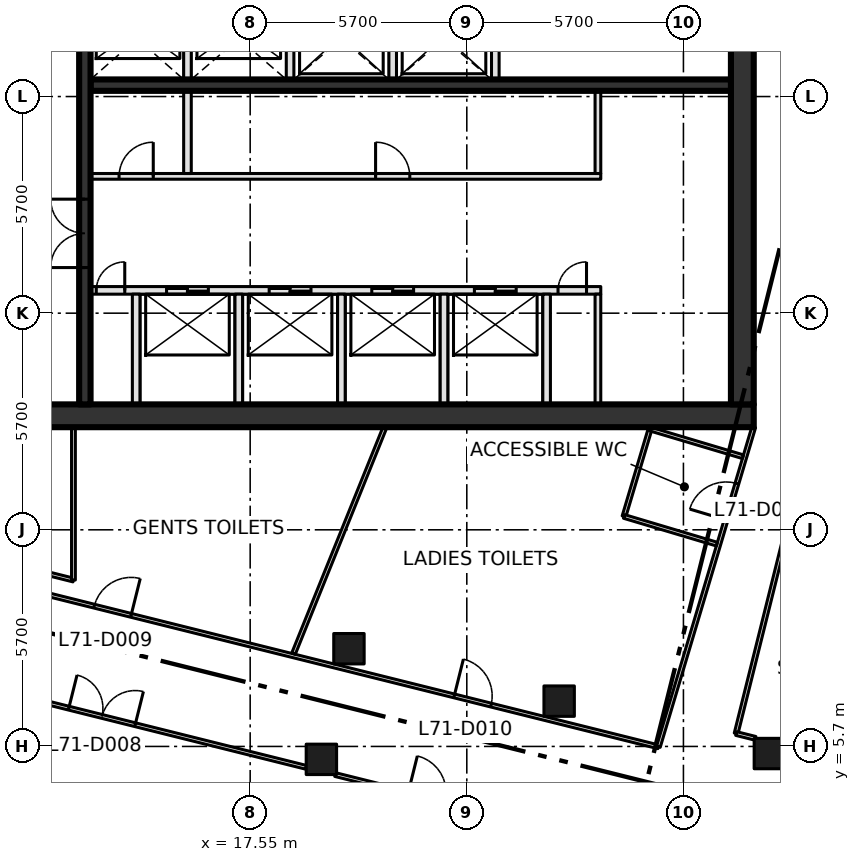
"""IFC4 building model, lengths in metres.
Left out: names, types, materials, properties, quantities, classifications, styles, units other than length and angle.
Written with IfcOpenShell. Run it as: python <this file> out.ifc"""

import sys

from ifc_helpers import new_model, si_unit, direction, frame, frame_2d, origin, origin_2d, place, context, subcontext, project, spatial, rectangle, extrude, element, fill, save


model = new_model("IFC4")
c1 = context("Model", 3, precision=1e-05, world=origin(), true_north=direction((0.0, 1.0)))
c2 = subcontext(c1, "Body", "Model", "MODEL_VIEW")
j1 = project(units=[si_unit("LENGTHUNIT", "METRE"), si_unit("PLANEANGLEUNIT", "RADIAN")], contexts=[c1])
p1 = place(None, origin())
s1 = spatial("IfcSite", under=j1, at=p1, CompositionType="ELEMENT")
p2 = place(p1, origin())
s2 = spatial("IfcBuilding", under=s1, at=p2, CompositionType="ELEMENT")
p3 = place(p2, frame((0.0, 0.0, 310.8)))
s3 = spatial("IfcBuildingStorey", under=s2, at=p3, CompositionType="ELEMENT", Elevation=310.8)
for number, where, z_axis, x_axis in (
    (1, (19.424, 5.36, 0.0), (0.0, 0.0, 1.0), (1.0, 0.0, 0.0)),
    (2, (20.149, 8.271, 0.0), (0.0, 0.0, 1.0), (1.0, 0.0, 0.0)),
    (3, (25.68, 6.892, 0.0), (0.0, 0.0, 1.0), (1.0, 0.0, 0.0)),
    (4, (31.211, 5.513, 0.0), (0.0, 0.0, 1.0), (1.0, 0.0, 0.0)),
):
    element("IfcColumn", number, at=place(p3, frame(where, z_axis=z_axis, x_axis=x_axis)), inside=s3, PredefinedType="COLUMN", context=c2, shape_type="SweptSolid", body=[
        extrude(rectangle(XDim=0.8, YDim=0.8, at=origin_2d()), origin(), (0.0, 0.0, 1.0), 4.2),
    ])
p4 = place(p3, frame((8.0, 14.4, -0.3), z_axis=(0.0, 0.0, 1.0), x_axis=(1.0, 0.0, 0.0)))
e5 = element("IfcWall", 5, at=p4, inside=s3, PredefinedType="SHEAR", context=c2, shape_type="SweptSolid", body=[
    extrude(rectangle(XDim=22.8, YDim=0.6, at=frame_2d((11.4, 0.0))), origin(), (0.0, 0.0, 1.0), 4.2),
])
p5 = place(p4, frame((2.3, 0.0, 0.3)))
e6 = element("IfcOpeningElement", 6, at=p5, cuts=e5, PredefinedType="OPENING", context=c2, shape_type="SweptSolid", body=[
    extrude(rectangle(XDim=1.8, YDim=2.1, at=frame_2d((0.9, 1.05))), frame((0.0, 0.31, 0.0), z_axis=(0.0, -1.0, 0.0), x_axis=(1.0, 0.0, 0.0)), (0.0, 0.0, 1.0), 0.62),
])
p6 = place(p3, frame((30.5, 14.7, -0.3), z_axis=(0.0, 0.0, 1.0), x_axis=(0.0, 1.0, 0.0)))
e7 = element("IfcWall", 7, at=p6, inside=s3, PredefinedType="SHEAR", context=c2, shape_type="SweptSolid", body=[
    extrude(rectangle(XDim=21.0, YDim=0.6, at=frame_2d((10.5, 0.0))), origin(), (0.0, 0.0, 1.0), 4.2),
])
p7 = place(p3, frame((13.35, 17.7, 0.0), z_axis=(0.0, 0.0, 1.0), x_axis=(1.0, 0.0, 0.0)))
e8 = element("IfcWall", 8, at=p7, inside=s3, PredefinedType="SOLIDWALL", context=c2, shape_type="SweptSolid", body=[
    extrude(rectangle(XDim=13.425, YDim=0.2, at=frame_2d((6.712, 0.0))), origin(), (0.0, 0.0, 1.0), 3.9),
])
p8 = place(p7, frame((2.0, 0.0, 0.0)))
e9 = element("IfcOpeningElement", 9, at=p8, cuts=e8, PredefinedType="OPENING", context=c2, shape_type="SweptSolid", body=[
    extrude(rectangle(XDim=1.1, YDim=2.1, at=frame_2d((0.55, 1.05))), frame((0.0, 0.11, 0.0), z_axis=(0.0, -1.0, 0.0), x_axis=(1.0, 0.0, 0.0)), (0.0, 0.0, 1.0), 0.22),
])
p9 = place(p7, frame((4.7, 0.0, 0.0)))
e10 = element("IfcOpeningElement", 10, at=p9, cuts=e8, PredefinedType="OPENING", context=c2, shape_type="SweptSolid", body=[
    extrude(rectangle(XDim=1.1, YDim=2.1, at=frame_2d((0.55, 1.05))), frame((0.0, 0.11, 0.0), z_axis=(0.0, -1.0, 0.0), x_axis=(1.0, 0.0, 0.0)), (0.0, 0.0, 1.0), 0.22),
])
p10 = place(p7, frame((7.4, 0.0, 0.0)))
e11 = element("IfcOpeningElement", 11, at=p10, cuts=e8, PredefinedType="OPENING", context=c2, shape_type="SweptSolid", body=[
    extrude(rectangle(XDim=1.1, YDim=2.1, at=frame_2d((0.55, 1.05))), frame((0.0, 0.11, 0.0), z_axis=(0.0, -1.0, 0.0), x_axis=(1.0, 0.0, 0.0)), (0.0, 0.0, 1.0), 0.22),
])
p11 = place(p7, frame((10.1, 0.0, 0.0)))
e12 = element("IfcOpeningElement", 12, at=p11, cuts=e8, PredefinedType="OPENING", context=c2, shape_type="SweptSolid", body=[
    extrude(rectangle(XDim=1.1, YDim=2.1, at=frame_2d((0.55, 1.05))), frame((0.0, 0.11, 0.0), z_axis=(0.0, -1.0, 0.0), x_axis=(1.0, 0.0, 0.0)), (0.0, 0.0, 1.0), 0.22),
])
p12 = place(p7, frame((0.15, 0.0, 0.0)))
e13 = element("IfcOpeningElement", 13, at=p12, cuts=e8, PredefinedType="OPENING", context=c2, shape_type="SweptSolid", body=[
    extrude(rectangle(XDim=0.75, YDim=2.1, at=frame_2d((0.375, 1.05))), frame((0.0, 0.11, 0.0), z_axis=(0.0, -1.0, 0.0), x_axis=(1.0, 0.0, 0.0)), (0.0, 0.0, 1.0), 0.22),
])
p13 = place(p7, frame((12.3, 0.0, 0.0)))
e14 = element("IfcOpeningElement", 14, at=p13, cuts=e8, PredefinedType="OPENING", context=c2, shape_type="SweptSolid", body=[
    extrude(rectangle(XDim=0.75, YDim=2.1, at=frame_2d((0.375, 1.05))), frame((0.0, 0.11, 0.0), z_axis=(0.0, -1.0, 0.0), x_axis=(1.0, 0.0, 0.0)), (0.0, 0.0, 1.0), 0.22),
])
p14 = place(p3, frame((13.35, 20.7, 0.0), z_axis=(0.0, 0.0, 1.0), x_axis=(1.0, 0.0, 0.0)))
e15 = element("IfcWall", 15, at=p14, inside=s3, PredefinedType="PARTITIONING", context=c2, shape_type="SweptSolid", body=[
    extrude(rectangle(XDim=13.425, YDim=0.15, at=frame_2d((6.712, 0.0))), origin(), (0.0, 0.0, 1.0), 3.9),
])
p15 = place(p14, frame((0.75, 0.0, 0.0)))
e16 = element("IfcOpeningElement", 16, at=p15, cuts=e15, PredefinedType="OPENING", context=c2, shape_type="SweptSolid", body=[
    extrude(rectangle(XDim=0.9, YDim=2.1, at=frame_2d((0.45, 1.05))), frame((0.0, 0.085, 0.0), z_axis=(0.0, -1.0, 0.0), x_axis=(1.0, 0.0, 0.0)), (0.0, 0.0, 1.0), 0.17),
])
p16 = place(p14, frame((7.5, 0.0, 0.0)))
e17 = element("IfcOpeningElement", 17, at=p16, cuts=e15, PredefinedType="OPENING", context=c2, shape_type="SweptSolid", body=[
    extrude(rectangle(XDim=0.9, YDim=2.1, at=frame_2d((0.45, 1.05))), frame((0.0, 0.085, 0.0), z_axis=(0.0, -1.0, 0.0), x_axis=(1.0, 0.0, 0.0)), (0.0, 0.0, 1.0), 0.17),
])
p17 = place(p3, frame((13.35, 23.1, 0.0), z_axis=(0.0, 0.0, 1.0), x_axis=(1.0, 0.0, 0.0)))
e18 = element("IfcWall", 18, at=p17, inside=s3, PredefinedType="SHEAR", context=c2, shape_type="SweptSolid", body=[
    extrude(rectangle(XDim=16.85, YDim=0.3, at=frame_2d((8.425, 0.0))), origin(), (0.0, 0.0, 1.0), 3.9),
])
p18 = place(p3, frame((13.2, 14.7, 0.0), z_axis=(0.0, 0.0, 1.0), x_axis=(0.0, 1.0, 0.0)))
e19 = element("IfcWall", 19, at=p18, inside=s3, PredefinedType="SHEAR", context=c2, shape_type="SweptSolid", body=[
    extrude(rectangle(XDim=21.0, YDim=0.3, at=frame_2d((10.5, 0.0))), origin(), (0.0, 0.0, 1.0), 3.9),
])
p19 = place(p18, frame((3.6, 0.0, 0.0)))
e20 = element("IfcOpeningElement", 20, at=p19, cuts=e19, PredefinedType="OPENING", context=c2, shape_type="SweptSolid", body=[
    extrude(rectangle(XDim=1.8, YDim=2.1, at=frame_2d((0.9, 1.05))), frame((0.0, 0.16, 0.0), z_axis=(0.0, -1.0, 0.0), x_axis=(1.0, 0.0, 0.0)), (0.0, 0.0, 1.0), 0.32),
])
p20 = place(p18, frame((11.7, 0.0, 0.0)))
e21 = element("IfcOpeningElement", 21, at=p20, cuts=e19, PredefinedType="OPENING", context=c2, shape_type="SweptSolid", body=[
    extrude(rectangle(XDim=1.2, YDim=2.1, at=frame_2d((0.6, 1.05))), frame((0.0, 0.16, 0.0), z_axis=(0.0, -1.0, 0.0), x_axis=(1.0, 0.0, 0.0)), (0.0, 0.0, 1.0), 0.32),
])
p21 = place(p3, frame((14.55, 14.7, 0.0), z_axis=(0.0, 0.0, 1.0), x_axis=(0.0, 1.0, 0.0)))
e22 = element("IfcWall", 22, at=p21, inside=s3, PredefinedType="SOLIDWALL", context=c2, shape_type="SweptSolid", body=[
    extrude(rectangle(XDim=2.9, YDim=0.2, at=frame_2d((1.45, 0.0))), origin(), (0.0, 0.0, 1.0), 3.9),
])
p22 = place(p3, frame((15.9, 20.775, 0.0), z_axis=(0.0, 0.0, 1.0), x_axis=(0.0, 1.0, 0.0)))
e23 = element("IfcWall", 23, at=p22, inside=s3, PredefinedType="SOLIDWALL", context=c2, shape_type="SweptSolid", body=[
    extrude(rectangle(XDim=4.625, YDim=0.2, at=frame_2d((2.312, 0.0))), origin(), (0.0, 0.0, 1.0), 3.9),
])
p23 = place(p3, frame((17.25, 14.7, 0.0), z_axis=(0.0, 0.0, 1.0), x_axis=(0.0, 1.0, 0.0)))
e24 = element("IfcWall", 24, at=p23, inside=s3, PredefinedType="SOLIDWALL", context=c2, shape_type="SweptSolid", body=[
    extrude(rectangle(XDim=2.9, YDim=0.2, at=frame_2d((1.45, 0.0))), origin(), (0.0, 0.0, 1.0), 3.9),
])
p24 = place(p3, frame((18.6, 23.25, 0.0), z_axis=(0.0, 0.0, 1.0), x_axis=(0.0, 1.0, 0.0)))
e25 = element("IfcWall", 25, at=p24, inside=s3, PredefinedType="SOLIDWALL", context=c2, shape_type="SweptSolid", body=[
    extrude(rectangle(XDim=5.15, YDim=0.2, at=frame_2d((2.575, 0.0))), origin(), (0.0, 0.0, 1.0), 3.9),
])
p25 = place(p24, frame((3.15, 0.0, 0.0)))
e26 = element("IfcOpeningElement", 26, at=p25, cuts=e25, PredefinedType="OPENING", context=c2, shape_type="SweptSolid", body=[
    extrude(rectangle(XDim=1.2, YDim=2.1, at=frame_2d((0.6, 1.05))), frame((0.0, 0.11, 0.0), z_axis=(0.0, -1.0, 0.0), x_axis=(1.0, 0.0, 0.0)), (0.0, 0.0, 1.0), 0.22),
])
p26 = place(p3, frame((19.95, 14.7, 0.0), z_axis=(0.0, 0.0, 1.0), x_axis=(0.0, 1.0, 0.0)))
e27 = element("IfcWall", 27, at=p26, inside=s3, PredefinedType="SOLIDWALL", context=c2, shape_type="SweptSolid", body=[
    extrude(rectangle(XDim=2.9, YDim=0.2, at=frame_2d((1.45, 0.0))), origin(), (0.0, 0.0, 1.0), 3.9),
])
p27 = place(p3, frame((21.3, 23.25, 0.0), z_axis=(0.0, 0.0, 1.0), x_axis=(0.0, 1.0, 0.0)))
e28 = element("IfcWall", 28, at=p27, inside=s3, PredefinedType="SOLIDWALL", context=c2, shape_type="SweptSolid", body=[
    extrude(rectangle(XDim=2.15, YDim=0.2, at=frame_2d((1.075, 0.0))), origin(), (0.0, 0.0, 1.0), 3.9),
])
p28 = place(p3, frame((22.65, 14.7, 0.0), z_axis=(0.0, 0.0, 1.0), x_axis=(0.0, 1.0, 0.0)))
e29 = element("IfcWall", 29, at=p28, inside=s3, PredefinedType="SOLIDWALL", context=c2, shape_type="SweptSolid", body=[
    extrude(rectangle(XDim=2.9, YDim=0.2, at=frame_2d((1.45, 0.0))), origin(), (0.0, 0.0, 1.0), 3.9),
])
p29 = place(p3, frame((24.0, 23.25, 0.0), z_axis=(0.0, 0.0, 1.0), x_axis=(0.0, 1.0, 0.0)))
e30 = element("IfcWall", 30, at=p29, inside=s3, PredefinedType="SOLIDWALL", context=c2, shape_type="SweptSolid", body=[
    extrude(rectangle(XDim=2.15, YDim=0.2, at=frame_2d((1.075, 0.0))), origin(), (0.0, 0.0, 1.0), 3.9),
])
p30 = place(p3, frame((25.35, 14.7, 0.0), z_axis=(0.0, 0.0, 1.0), x_axis=(0.0, 1.0, 0.0)))
e31 = element("IfcWall", 31, at=p30, inside=s3, PredefinedType="SOLIDWALL", context=c2, shape_type="SweptSolid", body=[
    extrude(rectangle(XDim=2.9, YDim=0.2, at=frame_2d((1.45, 0.0))), origin(), (0.0, 0.0, 1.0), 3.9),
])
p31 = place(p3, frame((26.7, 14.7, 0.0), z_axis=(0.0, 0.0, 1.0), x_axis=(0.0, 1.0, 0.0)))
e32 = element("IfcWall", 32, at=p31, inside=s3, PredefinedType="PARTITIONING", context=c2, shape_type="SweptSolid", body=[
    extrude(rectangle(XDim=2.9, YDim=0.15, at=frame_2d((1.45, 0.0))), origin(), (0.0, 0.0, 1.0), 3.9),
])
p32 = place(p3, frame((26.7, 20.775, 0.0), z_axis=(0.0, 0.0, 1.0), x_axis=(0.0, 1.0, 0.0)))
e33 = element("IfcWall", 33, at=p32, inside=s3, PredefinedType="PARTITIONING", context=c2, shape_type="SweptSolid", body=[
    extrude(rectangle(XDim=2.175, YDim=0.15, at=frame_2d((1.087, 0.0))), origin(), (0.0, 0.0, 1.0), 3.9),
])
p33 = place(p3, frame((8.333, 7.815, 0.0), z_axis=(0.0, 0.0, 1.0), x_axis=(0.970306508913, -0.241878644697, 0.0)))
e34 = element("IfcWall", 34, at=p33, inside=s3, PredefinedType="PARTITIONING", context=c2, shape_type="SweptSolid", body=[
    extrude(rectangle(XDim=11.018, YDim=0.1, at=frame_2d((5.509, 0.0))), origin(), (0.0, 0.0, 1.0), 3.9),
])
p34 = place(p33, frame((4.58, 0.0, 0.0)))
e35 = element("IfcOpeningElement", 35, at=p34, cuts=e34, PredefinedType="OPENING", context=c2, shape_type="SweptSolid", body=[
    extrude(rectangle(XDim=1.8, YDim=2.1, at=frame_2d((0.9, 1.05))), frame((0.0, 0.06, 0.0), z_axis=(0.0, -1.0, 0.0), x_axis=(1.0, 0.0, 0.0)), (0.0, 0.0, 1.0), 0.12),
])
p35 = place(p3, frame((9.002, 10.499, 0.0), z_axis=(0.0, 0.0, 1.0), x_axis=(0.970298340477, -0.241911410372, 0.0)))
e36 = element("IfcWall", 36, at=p35, inside=s3, PredefinedType="PARTITIONING", context=c2, shape_type="SweptSolid", body=[
    extrude(rectangle(XDim=19.88, YDim=0.1, at=frame_2d((9.94, 0.0))), origin(), (0.0, 0.0, 1.0), 3.9),
])
p36 = place(p35, frame((4.58, 0.0, 0.0)))
e37 = element("IfcOpeningElement", 37, at=p36, cuts=e36, PredefinedType="OPENING", context=c2, shape_type="SweptSolid", body=[
    extrude(rectangle(XDim=1.0, YDim=2.1, at=frame_2d((0.5, 1.05))), frame((0.0, 0.06, 0.0), z_axis=(0.0, -1.0, 0.0), x_axis=(1.0, 0.0, 0.0)), (0.0, 0.0, 1.0), 0.12),
])
p37 = place(p35, frame((14.343, 0.0, 0.0)))
e38 = element("IfcOpeningElement", 38, at=p37, cuts=e36, PredefinedType="OPENING", context=c2, shape_type="SweptSolid", body=[
    extrude(rectangle(XDim=1.0, YDim=2.1, at=frame_2d((0.5, 1.05))), frame((0.0, 0.06, 0.0), z_axis=(0.0, -1.0, 0.0), x_axis=(1.0, 0.0, 0.0)), (0.0, 0.0, 1.0), 0.12),
])
p38 = place(p3, frame((9.9, 10.826, 0.0), z_axis=(0.0, 0.0, 1.0), x_axis=(0.970290953223, -0.241941038466, 0.0)))
e39 = element("IfcWall", 39, at=p38, inside=s3, PredefinedType="PARTITIONING", context=c2, shape_type="SweptSolid", body=[
    extrude(rectangle(XDim=3.092, YDim=0.1, at=frame_2d((1.546, 0.0))), origin(), (0.0, 0.0, 1.0), 3.9),
])
p39 = place(p3, frame((12.9, 10.078, 0.0), z_axis=(0.0, 0.0, 1.0), x_axis=(0.0, 1.0, 0.0)))
e40 = element("IfcWall", 40, at=p39, inside=s3, PredefinedType="PARTITIONING", context=c2, shape_type="SweptSolid", body=[
    extrude(rectangle(XDim=4.022, YDim=0.1, at=frame_2d((2.011, 0.0))), origin(), (0.0, 0.0, 1.0), 3.9),
])
p40 = place(p3, frame((19.786, 4.96, 0.0), z_axis=(0.0, 0.0, 1.0), x_axis=(0.970335085454, -0.241763979817, 0.0)))
e41 = element("IfcWall", 41, at=p40, inside=s3, PredefinedType="PARTITIONING", context=c2, shape_type="SweptSolid", body=[
    extrude(rectangle(XDim=4.914, YDim=0.1, at=frame_2d((2.457, 0.0))), origin(), (0.0, 0.0, 1.0), 3.9),
])
p41 = place(p40, frame((1.98, 0.0, 0.0)))
e42 = element("IfcOpeningElement", 42, at=p41, cuts=e41, PredefinedType="OPENING", context=c2, shape_type="SweptSolid", body=[
    extrude(rectangle(XDim=1.0, YDim=2.1, at=frame_2d((0.5, 1.05))), frame((0.0, 0.06, 0.0), z_axis=(0.0, -1.0, 0.0), x_axis=(1.0, 0.0, 0.0)), (0.0, 0.0, 1.0), 0.12),
])
p42 = place(p3, frame((28.291, 5.69, 0.0), z_axis=(0.0, 0.0, 1.0), x_axis=(0.28588265334, 0.958264633867, 0.0)))
e43 = element("IfcWall", 43, at=p42, inside=s3, PredefinedType="PARTITIONING", context=c2, shape_type="SweptSolid", body=[
    extrude(rectangle(XDim=8.776, YDim=0.1, at=frame_2d((4.388, 0.0))), origin(), (0.0, 0.0, 1.0), 3.9),
])
p43 = place(p42, frame((6.23, 0.0, 0.0)))
e44 = element("IfcOpeningElement", 44, at=p43, cuts=e43, PredefinedType="OPENING", context=c2, shape_type="SweptSolid", body=[
    extrude(rectangle(XDim=1.0, YDim=2.1, at=frame_2d((0.5, 1.05))), frame((0.0, 0.06, 0.0), z_axis=(0.0, -1.0, 0.0), x_axis=(1.0, 0.0, 0.0)), (0.0, 0.0, 1.0), 0.12),
])
p44 = place(p3, frame((30.336, 6.04, 0.0), z_axis=(0.0, 0.0, 1.0), x_axis=(0.2420145387, 0.970272623059, 0.0)))
e45 = element("IfcWall", 45, at=p44, inside=s3, PredefinedType="PARTITIONING", context=c2, shape_type="SweptSolid", body=[
    extrude(rectangle(XDim=7.276, YDim=0.1, at=frame_2d((3.638, 0.0))), origin(), (0.0, 0.0, 1.0), 3.9),
])
p45 = place(p3, frame((30.845, 5.913, 0.0), z_axis=(0.0, 0.0, 1.0), x_axis=(-0.970279216762, 0.241988102022, 0.0)))
e46 = element("IfcWall", 46, at=p45, inside=s3, PredefinedType="PARTITIONING", context=c2, shape_type="SweptSolid", body=[
    extrude(rectangle(XDim=0.525, YDim=0.1, at=frame_2d((0.262, 0.0))), origin(), (0.0, 0.0, 1.0), 3.9),
])
p46 = place(p3, frame((18.691, 8.142, 0.0), z_axis=(0.0, 0.0, 1.0), x_axis=(0.374447972071, 0.927247925968, 0.0)))
e47 = element("IfcWall", 47, at=p46, inside=s3, PredefinedType="PARTITIONING", context=c2, shape_type="SweptSolid", body=[
    extrude(rectangle(XDim=6.426, YDim=0.1, at=frame_2d((3.213, 0.0))), origin(), (0.0, 0.0, 1.0), 3.9),
])
p47 = place(p3, frame((27.386, 11.752, 0.0), z_axis=(0.0, 0.0, 1.0), x_axis=(0.285826425332, 0.958281406781, 0.0)))
e48 = element("IfcWall", 48, at=p47, inside=s3, PredefinedType="PARTITIONING", context=c2, shape_type="SweptSolid", body=[
    extrude(rectangle(XDim=2.4, YDim=0.1, at=frame_2d((1.2, 0.0))), origin(), (0.0, 0.0, 1.0), 3.9),
])
for number, where, z_axis, x_axis in (
    (49, (28.072, 14.052, 0.0), (0.0, 0.0, 1.0), (0.958, -0.286, 0.0)),
    (50, (29.83, 11.023, 0.0), (0.0, 0.0, 1.0), (-0.958, 0.286, 0.0)),
):
    element("IfcWall", number, at=place(p3, frame(where, z_axis=z_axis, x_axis=x_axis)), inside=s3, PredefinedType="PARTITIONING", context=c2, shape_type="SweptSolid", body=[
        extrude(rectangle(XDim=2.551, YDim=0.1, at=frame_2d((1.275, 0.0))), origin(), (0.0, 0.0, 1.0), 3.9),
    ])
p48 = place(p8, origin())
e51 = element("IfcDoor", 51, at=p48, inside=s3, OperationType="SLIDING_TO_LEFT", PredefinedType="DOOR", context=c2, shape_type="SweptSolid", body=[
    extrude(rectangle(XDim=1.1, YDim=2.1, at=frame_2d((0.55, 1.05))), frame((0.0, 0.025, 0.0), z_axis=(0.0, -1.0, 0.0), x_axis=(1.0, 0.0, 0.0)), (0.0, 0.0, 1.0), 0.05),
])
fill(e9, e51)
p49 = place(p9, origin())
e52 = element("IfcDoor", 52, at=p49, inside=s3, OperationType="SLIDING_TO_LEFT", PredefinedType="DOOR", context=c2, shape_type="SweptSolid", body=[
    extrude(rectangle(XDim=1.1, YDim=2.1, at=frame_2d((0.55, 1.05))), frame((0.0, 0.025, 0.0), z_axis=(0.0, -1.0, 0.0), x_axis=(1.0, 0.0, 0.0)), (0.0, 0.0, 1.0), 0.05),
])
fill(e10, e52)
p50 = place(p10, origin())
e53 = element("IfcDoor", 53, at=p50, inside=s3, OperationType="SLIDING_TO_LEFT", PredefinedType="DOOR", context=c2, shape_type="SweptSolid", body=[
    extrude(rectangle(XDim=1.1, YDim=2.1, at=frame_2d((0.55, 1.05))), frame((0.0, 0.025, 0.0), z_axis=(0.0, -1.0, 0.0), x_axis=(1.0, 0.0, 0.0)), (0.0, 0.0, 1.0), 0.05),
])
fill(e11, e53)
p51 = place(p11, origin())
e54 = element("IfcDoor", 54, at=p51, inside=s3, OperationType="SLIDING_TO_LEFT", PredefinedType="DOOR", context=c2, shape_type="SweptSolid", body=[
    extrude(rectangle(XDim=1.1, YDim=2.1, at=frame_2d((0.55, 1.05))), frame((0.0, 0.025, 0.0), z_axis=(0.0, -1.0, 0.0), x_axis=(1.0, 0.0, 0.0)), (0.0, 0.0, 1.0), 0.05),
])
fill(e12, e54)
p52 = place(p12, origin())
e55 = element("IfcDoor", 55, at=p52, inside=s3, OperationType="SINGLE_SWING_RIGHT", PredefinedType="DOOR", context=c2, shape_type="SweptSolid", body=[
    extrude(rectangle(XDim=0.75, YDim=2.1, at=frame_2d((0.375, 1.05))), frame((0.0, 0.025, 0.0), z_axis=(0.0, -1.0, 0.0), x_axis=(1.0, 0.0, 0.0)), (0.0, 0.0, 1.0), 0.05),
])
fill(e13, e55)
p53 = place(p13, origin())
e56 = element("IfcDoor", 56, at=p53, inside=s3, OperationType="SINGLE_SWING_RIGHT", PredefinedType="DOOR", context=c2, shape_type="SweptSolid", body=[
    extrude(rectangle(XDim=0.75, YDim=2.1, at=frame_2d((0.375, 1.05))), frame((0.0, 0.025, 0.0), z_axis=(0.0, -1.0, 0.0), x_axis=(1.0, 0.0, 0.0)), (0.0, 0.0, 1.0), 0.05),
])
fill(e14, e56)
p54 = place(p15, origin())
e57 = element("IfcDoor", 57, at=p54, inside=s3, OperationType="SINGLE_SWING_RIGHT", PredefinedType="DOOR", context=c2, shape_type="SweptSolid", body=[
    extrude(rectangle(XDim=0.9, YDim=2.1, at=frame_2d((0.45, 1.05))), frame((0.0, 0.025, 0.0), z_axis=(0.0, -1.0, 0.0), x_axis=(1.0, 0.0, 0.0)), (0.0, 0.0, 1.0), 0.05),
])
fill(e16, e57)
p55 = place(p16, origin())
e58 = element("IfcDoor", 58, at=p55, inside=s3, OperationType="SINGLE_SWING_LEFT", PredefinedType="DOOR", context=c2, shape_type="SweptSolid", body=[
    extrude(rectangle(XDim=0.9, YDim=2.1, at=frame_2d((0.45, 1.05))), frame((0.0, 0.025, 0.0), z_axis=(0.0, -1.0, 0.0), x_axis=(1.0, 0.0, 0.0)), (0.0, 0.0, 1.0), 0.05),
])
fill(e17, e58)
p56 = place(p19, origin())
e59 = element("IfcDoor", 59, at=p56, inside=s3, OperationType="DOUBLE_DOOR_SINGLE_SWING", PredefinedType="DOOR", context=c2, shape_type="SweptSolid", body=[
    extrude(rectangle(XDim=1.8, YDim=2.1, at=frame_2d((0.9, 1.05))), frame((0.0, 0.025, 0.0), z_axis=(0.0, -1.0, 0.0), x_axis=(1.0, 0.0, 0.0)), (0.0, 0.0, 1.0), 0.05),
])
fill(e20, e59)
p57 = place(p34, origin())
e60 = element("IfcDoor", 60, at=p57, inside=s3, OperationType="DOUBLE_DOOR_SINGLE_SWING", PredefinedType="DOOR", context=c2, shape_type="SweptSolid", body=[
    extrude(rectangle(XDim=1.8, YDim=2.1, at=frame_2d((0.9, 1.05))), frame((0.0, 0.025, 0.0), z_axis=(0.0, -1.0, 0.0), x_axis=(1.0, 0.0, 0.0)), (0.0, 0.0, 1.0), 0.05),
])
fill(e35, e60)
p58 = place(p36, origin())
e61 = element("IfcDoor", 61, at=p58, inside=s3, OperationType="SINGLE_SWING_RIGHT", PredefinedType="DOOR", context=c2, shape_type="SweptSolid", body=[
    extrude(rectangle(XDim=1.0, YDim=2.1, at=frame_2d((0.5, 1.05))), frame((0.0, 0.025, 0.0), z_axis=(0.0, -1.0, 0.0), x_axis=(1.0, 0.0, 0.0)), (0.0, 0.0, 1.0), 0.05),
])
fill(e37, e61)
p59 = place(p37, origin())
e62 = element("IfcDoor", 62, at=p59, inside=s3, OperationType="SINGLE_SWING_LEFT", PredefinedType="DOOR", context=c2, shape_type="SweptSolid", body=[
    extrude(rectangle(XDim=1.0, YDim=2.1, at=frame_2d((0.5, 1.05))), frame((0.0, 0.025, 0.0), z_axis=(0.0, -1.0, 0.0), x_axis=(1.0, 0.0, 0.0)), (0.0, 0.0, 1.0), 0.05),
])
fill(e38, e62)
p60 = place(p43, origin())
e63 = element("IfcDoor", 63, at=p60, inside=s3, OperationType="SINGLE_SWING_LEFT", PredefinedType="DOOR", context=c2, shape_type="SweptSolid", body=[
    extrude(rectangle(XDim=1.0, YDim=2.1, at=frame_2d((0.5, 1.05))), frame((0.0, 0.025, 0.0), z_axis=(0.0, -1.0, 0.0), x_axis=(1.0, 0.0, 0.0)), (0.0, 0.0, 1.0), 0.05),
])
fill(e44, e63)
save(model, sys.argv[1])
